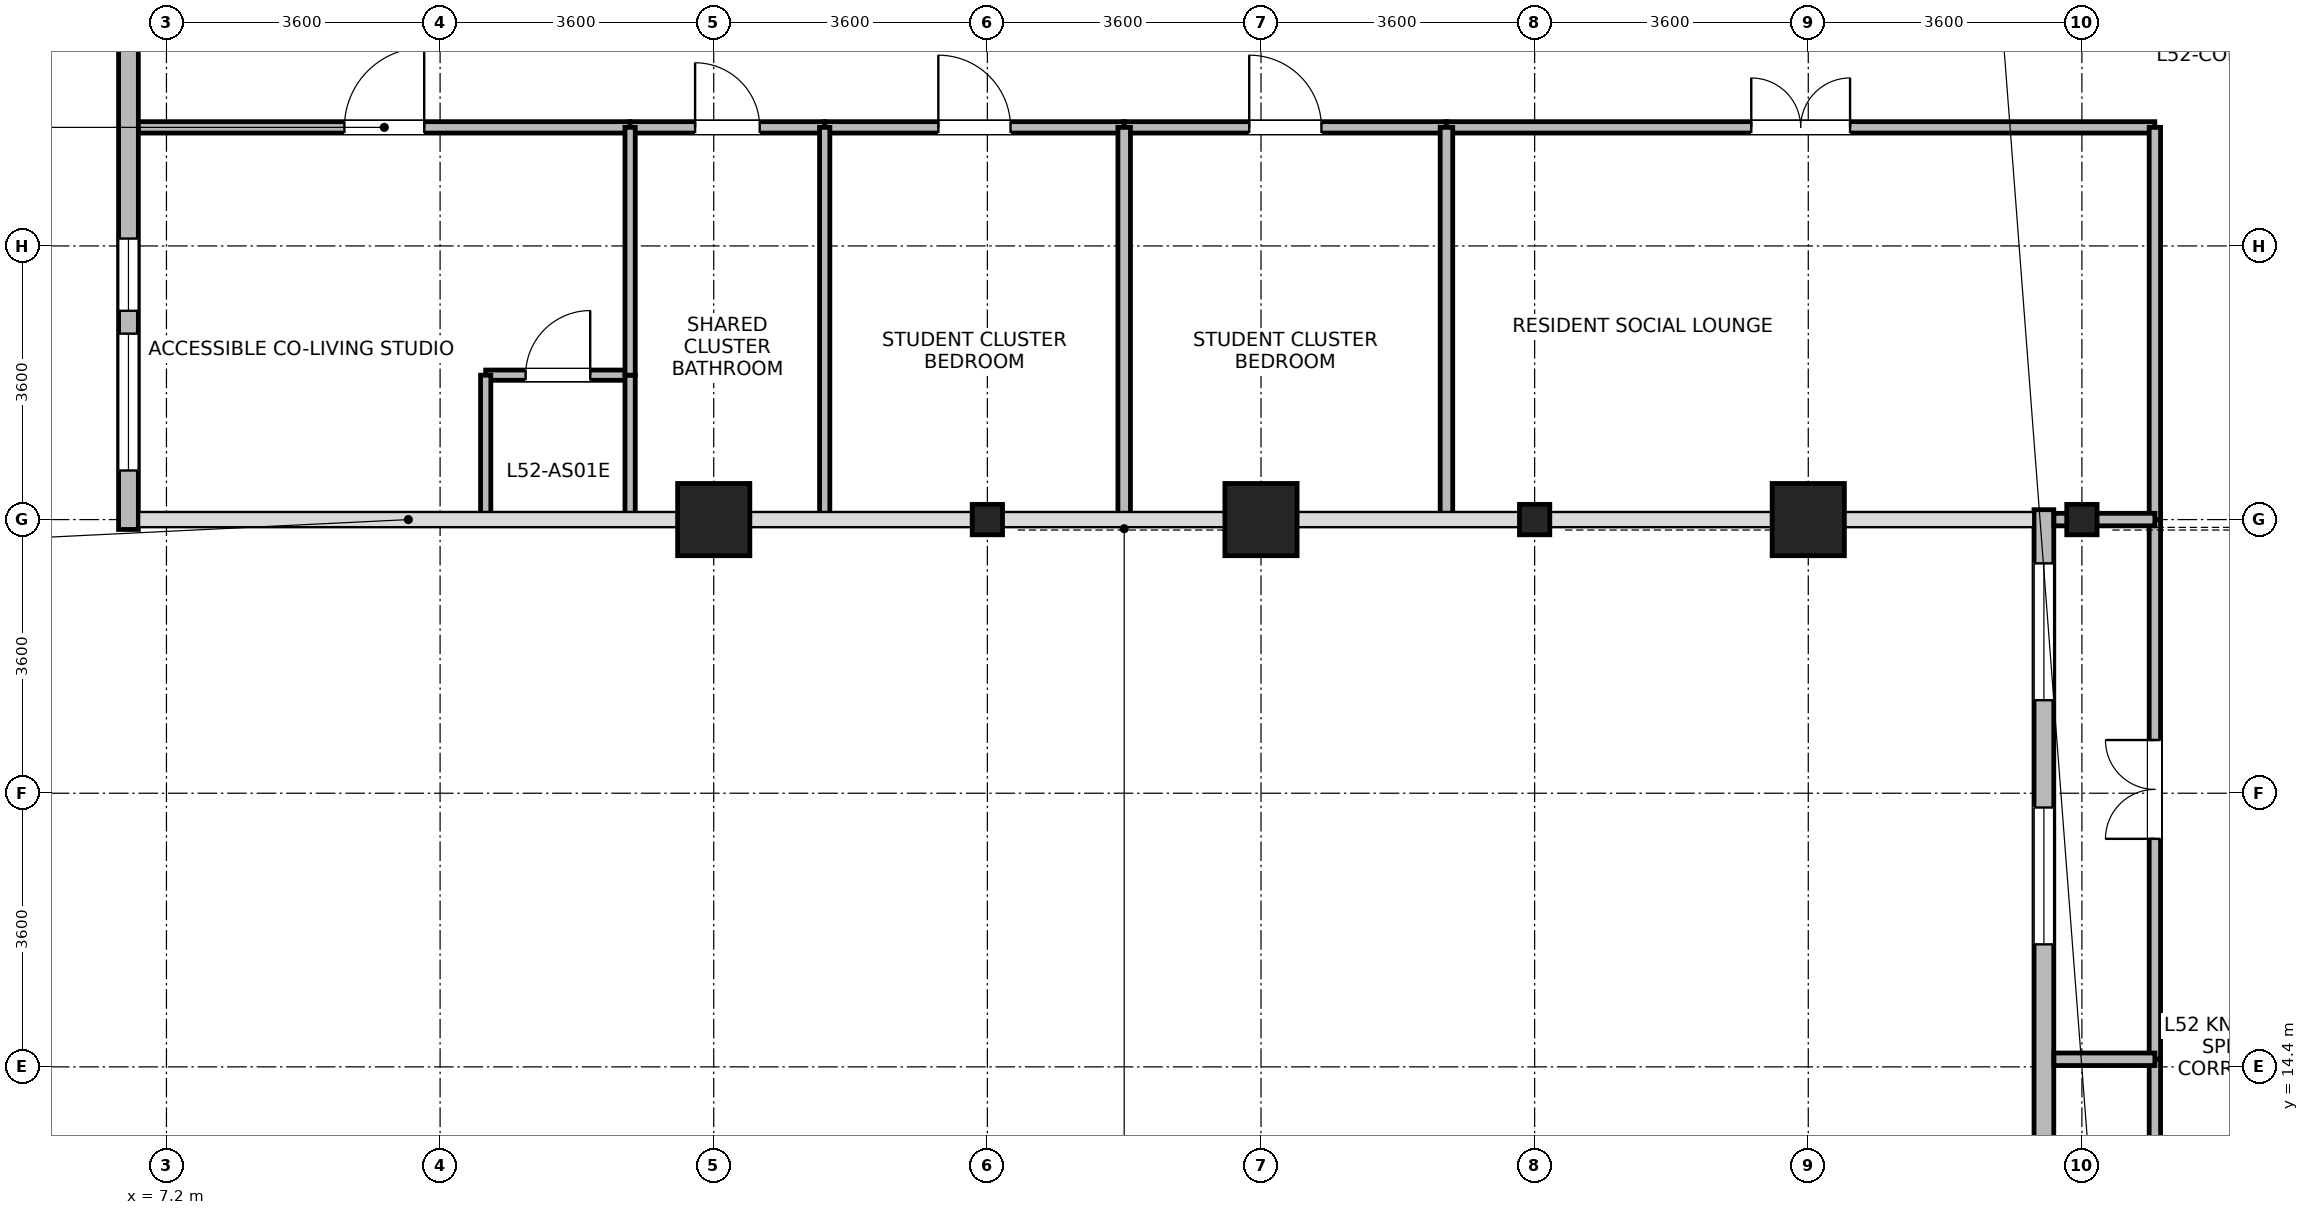
"""IFC4 building model, lengths in metres.
Left out: names, types, materials, properties, quantities, classifications, styles, units other than length and angle.
Written with IfcOpenShell. Run it as: python <this file> out.ifc"""

import sys

from ifc_helpers import new_model, si_unit, direction, frame, frame_2d, origin, origin_2d, place, context, subcontext, project, spatial, rectangle, i_section, extrude, source, transform, mapped, element, fill, save


model = new_model("IFC4")
c1 = context("Model", 3, precision=1e-05, world=origin(), true_north=direction((0.0, 1.0)))
c2 = subcontext(c1, "Body", "Model", "MODEL_VIEW")
j1 = project(units=[si_unit("LENGTHUNIT", "METRE"), si_unit("PLANEANGLEUNIT", "RADIAN")], contexts=[c1])
p1 = place(None, origin())
s1 = spatial("IfcSite", under=j1, at=p1, CompositionType="ELEMENT")
p2 = place(p1, origin())
s2 = spatial("IfcBuilding", under=s1, at=p2, CompositionType="ELEMENT")
p3 = place(p2, frame((0.0, 0.0, 205.5)))
s3 = spatial("IfcBuildingStorey", under=s2, at=p3, CompositionType="ELEMENT", Elevation=205.5)
m1 = source(origin(), c2, "Body", "SweptSolid", [
    extrude(rectangle(XDim=0.95, YDim=0.95, at=origin_2d()), origin(), (0.0, 0.0, 1.0), 3.7),
])
for number, where, z_axis, x_axis in (
    (1, (14.4, 21.6, 0.0), (0.0, 0.0, 1.0), (1.0, 0.0, 0.0)),
    (2, (21.6, 21.6, 0.0), (0.0, 0.0, 1.0), (1.0, 0.0, 0.0)),
    (3, (28.8, 21.6, 0.0), (0.0, 0.0, 1.0), (1.0, 0.0, 0.0)),
):
    element("IfcColumn", number, at=place(p3, frame(where, z_axis=z_axis, x_axis=x_axis)), inside=s3, PredefinedType="COLUMN", context=c2, shape_type="MappedRepresentation", body=[
        mapped(m1, transform((0.0, 0.0, 0.0), x_axis=(1.0, 0.0, 0.0), y_axis=(0.0, 1.0, 0.0), z_axis=(0.0, 0.0, 1.0), scale=1.0)),
    ])
m2 = source(origin(), c2, "Body", "SweptSolid", [
    extrude(i_section(OverallWidth=0.399, OverallDepth=0.4, WebThickness=0.017, FlangeThickness=0.023, FilletRadius=0.015, at=origin_2d()), origin(), (0.0, 0.0, 1.0), 3.7),
])
for number, where, z_axis, x_axis in (
    (4, (18.0, 21.6, 0.0), (0.0, 0.0, 1.0), (1.0, 0.0, 0.0)),
    (5, (25.2, 21.6, 0.0), (0.0, 0.0, 1.0), (1.0, 0.0, 0.0)),
    (6, (32.4, 21.6, 0.0), (0.0, 0.0, 1.0), (1.0, 0.0, 0.0)),
):
    element("IfcColumn", number, at=place(p3, frame(where, z_axis=z_axis, x_axis=x_axis)), inside=s3, PredefinedType="COLUMN", context=c2, shape_type="MappedRepresentation", body=[
        mapped(m2, transform((0.0, 0.0, 0.0), x_axis=(1.0, 0.0, 0.0), y_axis=(0.0, 1.0, 0.0), z_axis=(0.0, 0.0, 1.0), scale=1.0)),
    ])
p4 = place(p3, frame((6.7, 21.47, 0.0), z_axis=(0.0, 0.0, 1.0), x_axis=(0.0, 1.0, 0.0)))
e7 = element("IfcWall", 7, at=p4, inside=s3, PredefinedType="STANDARD", context=c2, shape_type="SweptSolid", body=[
    extrude(rectangle(XDim=6.704, YDim=0.26, at=frame_2d((3.352, 0.0))), origin(), (0.0, 0.0, 1.0), 3.45),
])
p5 = place(p4, frame((0.776, 0.0, 0.85)))
e8 = element("IfcOpeningElement", 8, at=p5, cuts=e7, PredefinedType="OPENING", context=c2, shape_type="SweptSolid", body=[
    extrude(rectangle(XDim=1.8, YDim=1.85, at=frame_2d((0.9, 0.925))), frame((0.0, 0.14, 0.0), z_axis=(0.0, -1.0, 0.0), x_axis=(1.0, 0.0, 0.0)), (0.0, 0.0, 1.0), 0.28),
])
p6 = place(p4, frame((2.877, 0.0, 0.85)))
e9 = element("IfcOpeningElement", 9, at=p6, cuts=e7, PredefinedType="OPENING", context=c2, shape_type="SweptSolid", body=[
    extrude(rectangle(XDim=0.95, YDim=1.75, at=frame_2d((0.475, 0.875))), frame((0.0, 0.14, 0.0), z_axis=(0.0, -1.0, 0.0), x_axis=(1.0, 0.0, 0.0)), (0.0, 0.0, 1.0), 0.28),
])
p7 = place(p3, frame((31.9, 5.67, 0.0), z_axis=(0.0, 0.0, 1.0), x_axis=(0.0, 1.0, 0.0)))
e10 = element("IfcWall", 10, at=p7, inside=s3, PredefinedType="STANDARD", context=c2, shape_type="SweptSolid", body=[
    extrude(rectangle(XDim=16.06, YDim=0.26, at=frame_2d((8.03, 0.0))), origin(), (0.0, 0.0, 1.0), 3.45),
])
p8 = place(p7, frame((3.918, 0.0, 0.85)))
e11 = element("IfcOpeningElement", 11, at=p8, cuts=e10, PredefinedType="OPENING", context=c2, shape_type="SweptSolid", body=[
    extrude(rectangle(XDim=1.8, YDim=1.85, at=frame_2d((0.9, 0.925))), frame((0.0, 0.14, 0.0), z_axis=(0.0, -1.0, 0.0), x_axis=(1.0, 0.0, 0.0)), (0.0, 0.0, 1.0), 0.28),
])
p9 = place(p7, frame((10.342, 0.0, 0.85)))
e12 = element("IfcOpeningElement", 12, at=p9, cuts=e10, PredefinedType="OPENING", context=c2, shape_type="SweptSolid", body=[
    extrude(rectangle(XDim=1.8, YDim=1.85, at=frame_2d((0.9, 0.925))), frame((0.0, 0.14, 0.0), z_axis=(0.0, -1.0, 0.0), x_axis=(1.0, 0.0, 0.0)), (0.0, 0.0, 1.0), 0.28),
])
p10 = place(p7, frame((13.554, 0.0, 0.85)))
e13 = element("IfcOpeningElement", 13, at=p10, cuts=e10, PredefinedType="OPENING", context=c2, shape_type="SweptSolid", body=[
    extrude(rectangle(XDim=1.8, YDim=1.85, at=frame_2d((0.9, 0.925))), frame((0.0, 0.14, 0.0), z_axis=(0.0, -1.0, 0.0), x_axis=(1.0, 0.0, 0.0)), (0.0, 0.0, 1.0), 0.28),
])
p11 = place(p3, frame((11.4, 23.5, 0.0), z_axis=(0.0, 0.0, 1.0), x_axis=(1.0, 0.0, 0.0)))
e14 = element("IfcWall", 14, at=p11, inside=s3, PredefinedType="PARTITIONING", context=c2, shape_type="SweptSolid", body=[
    extrude(rectangle(XDim=1.9, YDim=0.135, at=frame_2d((0.95, 0.0))), origin(), (0.0, 0.0, 1.0), 3.45),
])
p12 = place(p11, frame((0.525, 0.0, 0.0)))
e15 = element("IfcOpeningElement", 15, at=p12, cuts=e14, PredefinedType="OPENING", context=c2, shape_type="SweptSolid", body=[
    extrude(rectangle(XDim=0.85, YDim=2.04, at=frame_2d((0.425, 1.02))), frame((0.0, 0.078, 0.0), z_axis=(0.0, -1.0, 0.0), x_axis=(1.0, 0.0, 0.0)), (0.0, 0.0, 1.0), 0.155),
])
for number, where, z_axis, x_axis in (
    (16, (11.4, 21.62, 0.0), (0.0, 0.0, 1.0), (0.0, 1.0, 0.0)),
    (17, (13.3, 21.62, 0.0), (0.0, 0.0, 1.0), (0.0, 1.0, 0.0)),
):
    element("IfcWall", number, at=place(p3, frame(where, z_axis=z_axis, x_axis=x_axis)), inside=s3, PredefinedType="PARTITIONING", context=c2, shape_type="SweptSolid", body=[
        extrude(rectangle(XDim=1.88, YDim=0.135, at=frame_2d((0.94, 0.0))), origin(), (0.0, 0.0, 1.0), 3.45),
    ])
p13 = place(p3, frame((24.04, 26.76, 0.0), z_axis=(0.0, 0.0, 1.0), x_axis=(1.0, 0.0, 0.0)))
e18 = element("IfcWall", 18, at=p13, inside=s3, PredefinedType="PARTITIONING", context=c2, shape_type="SweptSolid", body=[
    extrude(rectangle(XDim=9.32, YDim=0.15, at=frame_2d((4.66, 0.0))), origin(), (0.0, 0.0, 1.0), 3.45),
])
p14 = place(p13, frame((4.01, 0.0, 0.0)))
e19 = element("IfcOpeningElement", 19, at=p14, cuts=e18, PredefinedType="OPENING", context=c2, shape_type="SweptSolid", body=[
    extrude(rectangle(XDim=1.3, YDim=2.12, at=frame_2d((0.65, 1.06))), frame((0.0, 0.085, 0.0), z_axis=(0.0, -1.0, 0.0), x_axis=(1.0, 0.0, 0.0)), (0.0, 0.0, 1.0), 0.17),
])
p15 = place(p3, frame((33.36, 14.5, 0.0), z_axis=(0.0, 0.0, 1.0), x_axis=(0.0, 1.0, 0.0)))
e20 = element("IfcWall", 20, at=p15, inside=s3, PredefinedType="PARTITIONING", context=c2, shape_type="SweptSolid", body=[
    extrude(rectangle(XDim=7.1, YDim=0.15, at=frame_2d((3.55, 0.0))), origin(), (0.0, 0.0, 1.0), 3.45),
])
p16 = place(p15, frame((2.9, 0.0, 0.0)))
e21 = element("IfcOpeningElement", 21, at=p16, cuts=e20, PredefinedType="OPENING", context=c2, shape_type="SweptSolid", body=[
    extrude(rectangle(XDim=1.3, YDim=2.12, at=frame_2d((0.65, 1.06))), frame((0.0, 0.085, 0.0), z_axis=(0.0, -1.0, 0.0), x_axis=(1.0, 0.0, 0.0)), (0.0, 0.0, 1.0), 0.17),
])
p17 = place(p3, frame((6.832, 26.76, 0.0), z_axis=(0.0, 0.0, 1.0), x_axis=(1.0, 0.0, 0.0)))
e22 = element("IfcWall", 22, at=p17, inside=s3, PredefinedType="PARTITIONING", context=c2, shape_type="SweptSolid", body=[
    extrude(rectangle(XDim=6.468, YDim=0.15, at=frame_2d((3.234, 0.0))), origin(), (0.0, 0.0, 1.0), 3.45),
])
p18 = place(p17, frame((2.709, 0.0, 0.0)))
e23 = element("IfcOpeningElement", 23, at=p18, cuts=e22, PredefinedType="OPENING", context=c2, shape_type="SweptSolid", body=[
    extrude(rectangle(XDim=1.05, YDim=2.12, at=frame_2d((0.525, 1.06))), frame((0.0, 0.085, 0.0), z_axis=(0.0, -1.0, 0.0), x_axis=(1.0, 0.0, 0.0)), (0.0, 0.0, 1.0), 0.17),
])
p19 = place(p3, frame((33.36, 8.0, 0.0), z_axis=(0.0, 0.0, 1.0), x_axis=(0.0, 1.0, 0.0)))
e24 = element("IfcWall", 24, at=p19, inside=s3, PredefinedType="PARTITIONING", context=c2, shape_type="SweptSolid", body=[
    extrude(rectangle(XDim=6.5, YDim=0.15, at=frame_2d((3.25, 0.0))), origin(), (0.0, 0.0, 1.0), 3.45),
])
p20 = place(p19, frame((2.6, 0.0, 0.0)))
e25 = element("IfcOpeningElement", 25, at=p20, cuts=e24, PredefinedType="OPENING", context=c2, shape_type="SweptSolid", body=[
    extrude(rectangle(XDim=1.3, YDim=2.12, at=frame_2d((0.65, 1.06))), frame((0.0, 0.085, 0.0), z_axis=(0.0, -1.0, 0.0), x_axis=(1.0, 0.0, 0.0)), (0.0, 0.0, 1.0), 0.17),
])
p21 = place(p3, frame((33.36, 21.6, 0.0), z_axis=(0.0, 0.0, 1.0), x_axis=(0.0, 1.0, 0.0)))
e26 = element("IfcWall", 26, at=p21, inside=s3, PredefinedType="PARTITIONING", context=c2, shape_type="SweptSolid", body=[
    extrude(rectangle(XDim=5.16, YDim=0.15, at=frame_2d((2.58, 0.0))), origin(), (0.0, 0.0, 1.0), 3.45),
])
p22 = place(p3, frame((19.8, 26.76, 0.0), z_axis=(0.0, 0.0, 1.0), x_axis=(1.0, 0.0, 0.0)))
e27 = element("IfcWall", 27, at=p22, inside=s3, PredefinedType="PARTITIONING", context=c2, shape_type="SweptSolid", body=[
    extrude(rectangle(XDim=4.24, YDim=0.15, at=frame_2d((2.12, 0.0))), origin(), (0.0, 0.0, 1.0), 3.45),
])
p23 = place(p22, frame((1.645, 0.0, 0.0)))
e28 = element("IfcOpeningElement", 28, at=p23, cuts=e27, PredefinedType="OPENING", context=c2, shape_type="SweptSolid", body=[
    extrude(rectangle(XDim=0.95, YDim=2.1, at=frame_2d((0.475, 1.05))), frame((0.0, 0.085, 0.0), z_axis=(0.0, -1.0, 0.0), x_axis=(1.0, 0.0, 0.0)), (0.0, 0.0, 1.0), 0.17),
])
p24 = place(p3, frame((15.86, 26.76, 0.0), z_axis=(0.0, 0.0, 1.0), x_axis=(1.0, 0.0, 0.0)))
e29 = element("IfcWall", 29, at=p24, inside=s3, PredefinedType="PARTITIONING", context=c2, shape_type="SweptSolid", body=[
    extrude(rectangle(XDim=3.94, YDim=0.15, at=frame_2d((1.97, 0.0))), origin(), (0.0, 0.0, 1.0), 3.45),
])
p25 = place(p24, frame((1.495, 0.0, 0.0)))
e30 = element("IfcOpeningElement", 30, at=p25, cuts=e29, PredefinedType="OPENING", context=c2, shape_type="SweptSolid", body=[
    extrude(rectangle(XDim=0.95, YDim=2.1, at=frame_2d((0.475, 1.05))), frame((0.0, 0.085, 0.0), z_axis=(0.0, -1.0, 0.0), x_axis=(1.0, 0.0, 0.0)), (0.0, 0.0, 1.0), 0.17),
])
p26 = place(p3, frame((13.3, 26.76, 0.0), z_axis=(0.0, 0.0, 1.0), x_axis=(1.0, 0.0, 0.0)))
e31 = element("IfcWall", 31, at=p26, inside=s3, PredefinedType="PARTITIONING", context=c2, shape_type="SweptSolid", body=[
    extrude(rectangle(XDim=2.56, YDim=0.15, at=frame_2d((1.28, 0.0))), origin(), (0.0, 0.0, 1.0), 3.45),
])
p27 = place(p26, frame((0.855, 0.0, 0.0)))
e32 = element("IfcOpeningElement", 32, at=p27, cuts=e31, PredefinedType="OPENING", context=c2, shape_type="SweptSolid", body=[
    extrude(rectangle(XDim=0.85, YDim=2.04, at=frame_2d((0.425, 1.02))), frame((0.0, 0.085, 0.0), z_axis=(0.0, -1.0, 0.0), x_axis=(1.0, 0.0, 0.0)), (0.0, 0.0, 1.0), 0.17),
])
p28 = place(p3, frame((15.86, 21.62, 0.0), z_axis=(0.0, 0.0, 1.0), x_axis=(0.0, 1.0, 0.0)))
e33 = element("IfcWall", 33, at=p28, inside=s3, PredefinedType="PARTITIONING", context=c2, shape_type="SweptSolid", body=[
    extrude(rectangle(XDim=5.14, YDim=0.135, at=frame_2d((2.57, 0.0))), origin(), (0.0, 0.0, 1.0), 3.45),
])
for number, where, z_axis, x_axis in (
    (34, (19.8, 21.62, 0.0), (0.0, 0.0, 1.0), (0.0, 1.0, 0.0)),
    (35, (24.04, 21.62, 0.0), (0.0, 0.0, 1.0), (0.0, 1.0, 0.0)),
):
    element("IfcWall", number, at=place(p3, frame(where, z_axis=z_axis, x_axis=x_axis)), inside=s3, PredefinedType="PARTITIONING", context=c2, shape_type="SweptSolid", body=[
        extrude(rectangle(XDim=5.14, YDim=0.165, at=frame_2d((2.57, 0.0))), origin(), (0.0, 0.0, 1.0), 3.45),
    ])
p29 = place(p3, frame((13.3, 23.5, 0.0), z_axis=(0.0, 0.0, 1.0), x_axis=(0.0, 1.0, 0.0)))
e36 = element("IfcWall", 36, at=p29, inside=s3, PredefinedType="PARTITIONING", context=c2, shape_type="SweptSolid", body=[
    extrude(rectangle(XDim=3.26, YDim=0.135, at=frame_2d((1.63, 0.0))), origin(), (0.0, 0.0, 1.0), 3.45),
])
p30 = place(p3, frame((32.032, 14.5, 0.0), z_axis=(0.0, 0.0, 1.0), x_axis=(1.0, 0.0, 0.0)))
e37 = element("IfcWall", 37, at=p30, inside=s3, PredefinedType="PARTITIONING", context=c2, shape_type="SweptSolid", body=[
    extrude(rectangle(XDim=1.328, YDim=0.165, at=frame_2d((0.664, 0.0))), origin(), (0.0, 0.0, 1.0), 3.45),
])
p31 = place(p3, frame((32.032, 21.6, 0.0), z_axis=(0.0, 0.0, 1.0), x_axis=(1.0, 0.0, 0.0)))
e38 = element("IfcWall", 38, at=p31, inside=s3, PredefinedType="PARTITIONING", context=c2, shape_type="SweptSolid", body=[
    extrude(rectangle(XDim=1.328, YDim=0.165, at=frame_2d((0.664, 0.0))), origin(), (0.0, 0.0, 1.0), 3.0),
])
p32 = place(p5, origin())
e39 = element("IfcWindow", 39, at=p32, inside=s3, PartitioningType="SINGLE_PANEL", PredefinedType="WINDOW", context=c2, shape_type="SweptSolid", body=[
    extrude(rectangle(XDim=1.8, YDim=1.85, at=frame_2d((0.9, 0.925))), frame((0.0, 0.03, 0.0), z_axis=(0.0, -1.0, 0.0), x_axis=(1.0, 0.0, 0.0)), (0.0, 0.0, 1.0), 0.06),
])
fill(e8, e39)
p33 = place(p6, origin())
e40 = element("IfcWindow", 40, at=p33, inside=s3, PartitioningType="SINGLE_PANEL", PredefinedType="WINDOW", context=c2, shape_type="SweptSolid", body=[
    extrude(rectangle(XDim=0.95, YDim=1.75, at=frame_2d((0.475, 0.875))), frame((0.0, 0.03, 0.0), z_axis=(0.0, -1.0, 0.0), x_axis=(1.0, 0.0, 0.0)), (0.0, 0.0, 1.0), 0.06),
])
fill(e9, e40)
p34 = place(p9, origin())
e41 = element("IfcWindow", 41, at=p34, inside=s3, PartitioningType="SINGLE_PANEL", PredefinedType="WINDOW", context=c2, shape_type="SweptSolid", body=[
    extrude(rectangle(XDim=1.8, YDim=1.85, at=frame_2d((0.9, 0.925))), frame((0.0, 0.03, 0.0), z_axis=(0.0, -1.0, 0.0), x_axis=(1.0, 0.0, 0.0)), (0.0, 0.0, 1.0), 0.06),
])
fill(e12, e41)
p35 = place(p10, origin())
e42 = element("IfcWindow", 42, at=p35, inside=s3, PartitioningType="SINGLE_PANEL", PredefinedType="WINDOW", context=c2, shape_type="SweptSolid", body=[
    extrude(rectangle(XDim=1.8, YDim=1.85, at=frame_2d((0.9, 0.925))), frame((0.0, 0.03, 0.0), z_axis=(0.0, -1.0, 0.0), x_axis=(1.0, 0.0, 0.0)), (0.0, 0.0, 1.0), 0.06),
])
fill(e13, e42)
p36 = place(p12, origin())
e43 = element("IfcDoor", 43, at=p36, inside=s3, OperationType="SINGLE_SWING_RIGHT", PredefinedType="DOOR", context=c2, shape_type="SweptSolid", body=[
    extrude(rectangle(XDim=0.85, YDim=2.04, at=frame_2d((0.425, 1.02))), frame((0.0, 0.025, 0.0), z_axis=(0.0, -1.0, 0.0), x_axis=(1.0, 0.0, 0.0)), (0.0, 0.0, 1.0), 0.05),
])
fill(e15, e43)
p37 = place(p14, origin())
e44 = element("IfcDoor", 44, at=p37, inside=s3, OperationType="DOUBLE_DOOR_SINGLE_SWING", PredefinedType="DOOR", context=c2, shape_type="SweptSolid", body=[
    extrude(rectangle(XDim=1.3, YDim=2.12, at=frame_2d((0.65, 1.06))), frame((0.0, 0.025, 0.0), z_axis=(0.0, -1.0, 0.0), x_axis=(1.0, 0.0, 0.0)), (0.0, 0.0, 1.0), 0.05),
])
fill(e19, e44)
p38 = place(p16, origin())
e45 = element("IfcDoor", 45, at=p38, inside=s3, OperationType="DOUBLE_DOOR_SINGLE_SWING", PredefinedType="DOOR", context=c2, shape_type="SweptSolid", body=[
    extrude(rectangle(XDim=1.3, YDim=2.12, at=frame_2d((0.65, 1.06))), frame((0.0, 0.025, 0.0), z_axis=(0.0, -1.0, 0.0), x_axis=(1.0, 0.0, 0.0)), (0.0, 0.0, 1.0), 0.05),
])
fill(e21, e45)
p39 = place(p18, origin())
e46 = element("IfcDoor", 46, at=p39, inside=s3, OperationType="SINGLE_SWING_RIGHT", PredefinedType="DOOR", context=c2, shape_type="SweptSolid", body=[
    extrude(rectangle(XDim=1.05, YDim=2.12, at=frame_2d((0.525, 1.06))), frame((0.0, 0.025, 0.0), z_axis=(0.0, -1.0, 0.0), x_axis=(1.0, 0.0, 0.0)), (0.0, 0.0, 1.0), 0.05),
])
fill(e23, e46)
p40 = place(p23, origin())
e47 = element("IfcDoor", 47, at=p40, inside=s3, OperationType="SINGLE_SWING_LEFT", PredefinedType="DOOR", context=c2, shape_type="SweptSolid", body=[
    extrude(rectangle(XDim=0.95, YDim=2.1, at=frame_2d((0.475, 1.05))), frame((0.0, 0.025, 0.0), z_axis=(0.0, -1.0, 0.0), x_axis=(1.0, 0.0, 0.0)), (0.0, 0.0, 1.0), 0.05),
])
fill(e28, e47)
p41 = place(p25, origin())
e48 = element("IfcDoor", 48, at=p41, inside=s3, OperationType="SINGLE_SWING_LEFT", PredefinedType="DOOR", context=c2, shape_type="SweptSolid", body=[
    extrude(rectangle(XDim=0.95, YDim=2.1, at=frame_2d((0.475, 1.05))), frame((0.0, 0.025, 0.0), z_axis=(0.0, -1.0, 0.0), x_axis=(1.0, 0.0, 0.0)), (0.0, 0.0, 1.0), 0.05),
])
fill(e30, e48)
p42 = place(p27, origin())
e49 = element("IfcDoor", 49, at=p42, inside=s3, OperationType="SINGLE_SWING_LEFT", PredefinedType="DOOR", context=c2, shape_type="SweptSolid", body=[
    extrude(rectangle(XDim=0.85, YDim=2.04, at=frame_2d((0.425, 1.02))), frame((0.0, 0.025, 0.0), z_axis=(0.0, -1.0, 0.0), x_axis=(1.0, 0.0, 0.0)), (0.0, 0.0, 1.0), 0.05),
])
fill(e32, e49)
save(model, sys.argv[1])
